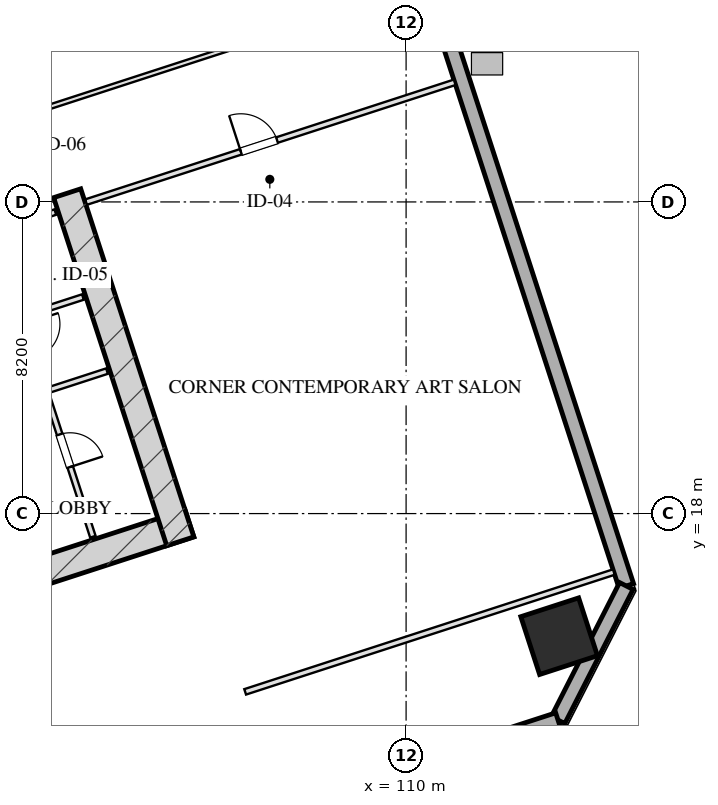
"""IFC4 building model, lengths in metres.
Left out: names, types, materials, properties, quantities, classifications, styles, units other than length and angle.
Written with IfcOpenShell. Run it as: python <this file> out.ifc"""

import sys

from ifc_helpers import new_model, si_unit, direction, frame, frame_2d, origin, origin_2d, place, context, subcontext, project, spatial, rectangle, hollow_rectangle, extrude, element, fill, save


model = new_model("IFC4")
c1 = context("Model", 3, precision=1e-05, world=origin(), true_north=direction((0.0, 1.0)))
c2 = subcontext(c1, "Body", "Model", "MODEL_VIEW")
j1 = project(units=[si_unit("LENGTHUNIT", "METRE"), si_unit("PLANEANGLEUNIT", "RADIAN")], contexts=[c1])
p1 = place(None, origin())
s1 = spatial("IfcSite", under=j1, at=p1, CompositionType="ELEMENT")
p2 = place(p1, origin())
s2 = spatial("IfcBuilding", under=s1, at=p2, CompositionType="ELEMENT")
p3 = place(p2, frame((0.0, 0.0, 57.5)))
s3 = spatial("IfcBuildingStorey", under=s2, at=p3, CompositionType="ELEMENT", Elevation=57.5)
p4 = place(p3, frame((88.559, 12.629, 0.0), z_axis=(0.0, 0.0, 1.0), x_axis=(0.951056072937, 0.309018358888, 0.0)))
e1 = element("IfcWall", 1, at=p4, inside=s3, PredefinedType="SHEAR", context=c2, shape_type="SweptSolid", body=[
    extrude(rectangle(XDim=16.55, YDim=0.75, at=frame_2d((8.275, 0.0))), origin(), (0.0, 0.0, 1.0), 3.45),
])
p5 = place(p3, frame((101.082, 26.429, 0.0), z_axis=(0.0, 0.0, 1.0), x_axis=(0.309016134813, -0.951056795583, 0.0)))
e2 = element("IfcWall", 2, at=p5, inside=s3, PredefinedType="SHEAR", context=c2, shape_type="SweptSolid", body=[
    extrude(rectangle(XDim=9.63, YDim=0.75, at=frame_2d((4.815, 0.0))), origin(), (0.0, 0.0, 1.0), 3.45),
])
p6 = place(p3, frame((114.027, 14.774, 0.0), z_axis=(0.0, 0.0, 1.0), x_axis=(0.951056516295, 0.309016994375, 0.0)))
e3 = element("IfcColumn", 3, at=p6, inside=s3, PredefinedType="COLUMN", context=c2, shape_type="SweptSolid", body=[
    extrude(hollow_rectangle(XDim=1.6, YDim=1.6, WallThickness=0.055, at=origin_2d()), origin(), (0.0, 0.0, 1.0), 3.451),
])
p7 = place(p3, frame((100.345, 63.648, 0.0), z_axis=(0.0, 0.0, 1.0), x_axis=(0.309014526607, -0.951057318118, 0.0)))
e4 = element("IfcWall", 4, at=p7, inside=s3, PredefinedType="SOLIDWALL", context=c2, shape_type="SweptSolid", body=[
    extrude(rectangle(XDim=50.0, YDim=0.4, at=frame_2d((25.0, 0.0))), origin(), (0.0, 0.0, 1.0), 2.61),
])
p8 = place(p7, frame((21.85, 0.0, 0.0)))
e5 = element("IfcOpeningElement", 5, at=p8, cuts=e4, PredefinedType="OPENING", context=c2, shape_type="SweptSolid", body=[
    extrude(rectangle(XDim=1.1, YDim=2.15, at=frame_2d((0.55, 1.075))), frame((0.0, 0.21, 0.0), z_axis=(0.0, -1.0, 0.0), x_axis=(1.0, 0.0, 0.0)), (0.0, 0.0, 1.0), 0.42),
])
p9 = place(p3, frame((115.795, 16.095, 0.0), z_axis=(0.0, 0.0, 1.0), x_axis=(-0.453958106755, -0.891023028497, 0.0)))
e6 = element("IfcWall", 6, at=p9, inside=s3, PredefinedType="SOLIDWALL", context=c2, shape_type="SweptSolid", body=[
    extrude(rectangle(XDim=3.96, YDim=0.4, at=frame_2d((1.98, 0.0))), origin(), (0.0, 0.0, 1.0), 2.61),
])
p10 = place(p3, frame((113.998, 12.567, 0.0), z_axis=(0.0, 0.0, 1.0), x_axis=(-0.951055939317, -0.309018770125, 0.0)))
e7 = element("IfcWall", 7, at=p10, inside=s3, PredefinedType="SOLIDWALL", context=c2, shape_type="SweptSolid", body=[
    extrude(rectangle(XDim=32.4, YDim=0.4, at=frame_2d((16.2, 0.0))), origin(), (0.0, 0.0, 1.0), 2.61),
])
p11 = place(p3, frame((97.727, 24.944, 0.0), z_axis=(0.0, 0.0, 1.0), x_axis=(0.951036872128, 0.309077446369, 0.0)))
e8 = element("IfcWall", 8, at=p11, inside=s3, PredefinedType="PARTITIONING", context=c2, shape_type="SweptSolid", body=[
    extrude(rectangle(XDim=3.2, YDim=0.15, at=frame_2d((1.6, 0.0))), origin(), (0.0, 0.0, 1.0), 3.175),
])
p12 = place(p11, frame((0.22, 0.0, 0.0)))
e9 = element("IfcOpeningElement", 9, at=p12, cuts=e8, PredefinedType="OPENING", context=c2, shape_type="SweptSolid", body=[
    extrude(rectangle(XDim=0.95, YDim=2.05, at=frame_2d((0.475, 1.025))), frame((0.0, 0.085, 0.0), z_axis=(0.0, -1.0, 0.0), x_axis=(1.0, 0.0, 0.0)), (0.0, 0.0, 1.0), 0.17),
])
p13 = place(p11, frame((1.95, 0.0, 0.0)))
e10 = element("IfcOpeningElement", 10, at=p13, cuts=e8, PredefinedType="OPENING", context=c2, shape_type="SweptSolid", body=[
    extrude(rectangle(XDim=0.9, YDim=2.05, at=frame_2d((0.45, 1.025))), frame((0.0, 0.085, 0.0), z_axis=(0.0, -1.0, 0.0), x_axis=(1.0, 0.0, 0.0)), (0.0, 0.0, 1.0), 0.17),
])
p14 = place(p3, frame((99.153, 25.408, 0.0), z_axis=(0.0, 0.0, 1.0), x_axis=(0.309016001439, -0.951056838919, 0.0)))
e11 = element("IfcWall", 11, at=p14, inside=s3, PredefinedType="PARTITIONING", context=c2, shape_type="SweptSolid", body=[
    extrude(rectangle(XDim=8.43, YDim=0.15, at=frame_2d((4.215, 0.0))), origin(), (0.0, 0.0, 1.0), 3.175),
])
p15 = place(p14, frame((2.55, 0.0, 0.0)))
e12 = element("IfcOpeningElement", 12, at=p15, cuts=e11, PredefinedType="OPENING", context=c2, shape_type="SweptSolid", body=[
    extrude(rectangle(XDim=0.95, YDim=2.05, at=frame_2d((0.475, 1.025))), frame((0.0, 0.085, 0.0), z_axis=(0.0, -1.0, 0.0), x_axis=(1.0, 0.0, 0.0)), (0.0, 0.0, 1.0), 0.17),
])
p16 = place(p14, frame((5.6, 0.0, 0.0)))
e13 = element("IfcOpeningElement", 13, at=p16, cuts=e11, PredefinedType="OPENING", context=c2, shape_type="SweptSolid", body=[
    extrude(rectangle(XDim=0.9, YDim=2.05, at=frame_2d((0.45, 1.025))), frame((0.0, 0.085, 0.0), z_axis=(0.0, -1.0, 0.0), x_axis=(1.0, 0.0, 0.0)), (0.0, 0.0, 1.0), 0.17),
])
for number, where, z_axis, x_axis in (
    (14, (100.513, 21.223, 0.0), (0.0, 0.0, 1.0), (0.951, 0.309, 0.0)),
    (15, (99.879, 23.173, 0.0), (0.0, 0.0, 1.0), (0.951, 0.309, 0.0)),
):
    element("IfcWall", number, at=place(p3, frame(where, z_axis=z_axis, x_axis=x_axis)), inside=s3, PredefinedType="PARTITIONING", context=c2, shape_type="SweptSolid", body=[
        extrude(rectangle(XDim=1.7, YDim=0.15, at=frame_2d((0.85, 0.0))), origin(), (0.0, 0.0, 1.0), 3.175),
    ])
p17 = place(p3, frame((105.765, 13.309, 0.0), z_axis=(0.0, 0.0, 1.0), x_axis=(0.951054294345, 0.309023832749, 0.0)))
e16 = element("IfcWall", 16, at=p17, inside=s3, PredefinedType="PARTITIONING", context=c2, shape_type="SweptSolid", body=[
    extrude(rectangle(XDim=10.2, YDim=0.15, at=frame_2d((5.1, 0.0))), origin(), (0.0, 0.0, 1.0), 3.175),
])
p18 = place(p3, frame((101.578, 26.196, 0.0), z_axis=(0.0, 0.0, 1.0), x_axis=(0.951059043131, 0.309009217467, 0.0)))
e17 = element("IfcWall", 17, at=p18, inside=s3, PredefinedType="PARTITIONING", context=c2, shape_type="SweptSolid", body=[
    extrude(rectangle(XDim=10.2, YDim=0.15, at=frame_2d((5.1, 0.0))), origin(), (0.0, 0.0, 1.0), 3.175),
])
p19 = place(p18, frame((4.284, 0.0, 0.0)))
e18 = element("IfcOpeningElement", 18, at=p19, cuts=e17, PredefinedType="OPENING", context=c2, shape_type="SweptSolid", body=[
    extrude(rectangle(XDim=1.0, YDim=2.05, at=frame_2d((0.5, 1.025))), frame((0.0, 0.085, 0.0), z_axis=(0.0, -1.0, 0.0), x_axis=(1.0, 0.0, 0.0)), (0.0, 0.0, 1.0), 0.17),
])
for number, where, z_axis, x_axis in (
    (19, (93.546, 26.404, 0.0), (0.0, 0.0, 1.0), (0.951, 0.309, 0.0)),
    (20, (92.52, 29.562, 0.0), (0.0, 0.0, 1.0), (0.951, 0.309, 0.0)),
):
    element("IfcWall", number, at=place(p3, frame(where, z_axis=z_axis, x_axis=x_axis)), inside=s3, PredefinedType="PARTITIONING", context=c2, shape_type="SweptSolid", body=[
        extrude(rectangle(XDim=17.775, YDim=0.12, at=frame_2d((8.887, 0.0))), origin(), (0.0, 0.0, 1.0), 3.175),
    ])
p20 = place(p16, origin())
e21 = element("IfcDoor", 21, at=p20, inside=s3, OperationType="SINGLE_SWING_RIGHT", PredefinedType="DOOR", context=c2, shape_type="SweptSolid", body=[
    extrude(rectangle(XDim=0.9, YDim=2.05, at=frame_2d((0.45, 1.025))), frame((0.0, 0.025, 0.0), z_axis=(0.0, -1.0, 0.0), x_axis=(1.0, 0.0, 0.0)), (0.0, 0.0, 1.0), 0.05),
])
fill(e13, e21)
p21 = place(p19, origin())
e22 = element("IfcDoor", 22, at=p21, inside=s3, OperationType="SINGLE_SWING_LEFT", PredefinedType="DOOR", context=c2, shape_type="SweptSolid", body=[
    extrude(rectangle(XDim=1.0, YDim=2.05, at=frame_2d((0.5, 1.025))), frame((0.0, 0.025, 0.0), z_axis=(0.0, -1.0, 0.0), x_axis=(1.0, 0.0, 0.0)), (0.0, 0.0, 1.0), 0.05),
])
fill(e18, e22)
save(model, sys.argv[1])
